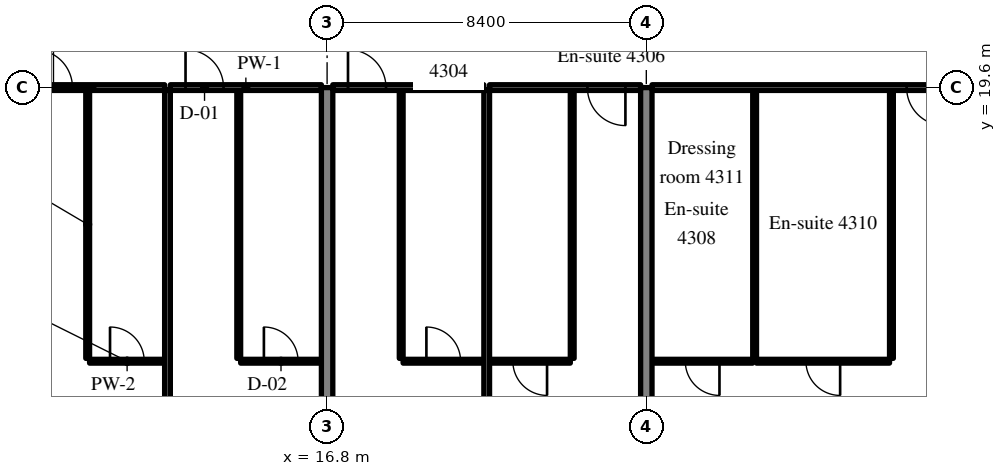
"""IFC4 building model, lengths in metres.
Left out: names, types, materials, properties, quantities, classifications, styles, units other than length and angle.
Written with IfcOpenShell. Run it as: python <this file> out.ifc"""

import sys

from ifc_helpers import new_model, si_unit, direction, frame, frame_2d, origin, place, context, subcontext, project, spatial, rectangle, extrude, source, transform, mapped, element, fill, save


model = new_model("IFC4")
c1 = context("Model", 3, precision=1e-05, world=origin(), true_north=direction((0.0, 1.0)))
c2 = subcontext(c1, "Body", "Model", "MODEL_VIEW")
j1 = project(units=[si_unit("LENGTHUNIT", "METRE"), si_unit("PLANEANGLEUNIT", "RADIAN")], contexts=[c1])
p1 = place(None, origin())
s1 = spatial("IfcSite", under=j1, at=p1, CompositionType="ELEMENT")
p2 = place(p1, origin())
s2 = spatial("IfcBuilding", under=s1, at=p2, CompositionType="ELEMENT")
p3 = place(p2, frame((0.0, 0.0, 178.2)))
s3 = spatial("IfcBuildingStorey", under=s2, at=p3, CompositionType="ELEMENT", Elevation=178.2)
m1 = source(origin(), c2, "Body", "SweptSolid", [
    extrude(rectangle(XDim=14.1, YDim=0.3, at=frame_2d((7.05, 0.0))), origin(), (0.0, 0.0, 1.0), 3.52),
])
for number, where, z_axis, x_axis in (
    (1, (16.8, 5.5, 0.0), (0.0, 0.0, 1.0), (0.0, 1.0, 0.0)),
    (2, (25.2, 5.5, 0.0), (0.0, 0.0, 1.0), (0.0, 1.0, 0.0)),
):
    element("IfcWall", number, at=place(p3, frame(where, z_axis=z_axis, x_axis=x_axis)), inside=s3, PredefinedType="SHEAR", context=c2, shape_type="MappedRepresentation", body=[
        mapped(m1, transform((0.0, 0.0, 0.0), scale=1.0)),
    ])
m2 = source(origin(), c2, "Body", "SweptSolid", [
    extrude(rectangle(XDim=7.05, YDim=0.1, at=frame_2d((3.525, 0.0))), origin(), (0.0, 0.0, 1.0), 3.52),
])
p4 = place(p3, frame((10.5, 12.475, 0.0), z_axis=(0.0, 0.0, 1.0), x_axis=(0.0, 1.0, 0.0)))
e3 = element("IfcWall", 3, at=p4, inside=s3, PredefinedType="PARTITIONING", context=c2, shape_type="MappedRepresentation", body=[
    mapped(m2, transform((0.0, 0.0, 0.0), scale=1.0)),
])
m3 = source(origin(), c2, "Body", "SweptSolid", [
    extrude(rectangle(XDim=1.975, YDim=0.1, at=frame_2d((0.987, 0.0))), origin(), (0.0, 0.0, 1.0), 3.52),
])
p5 = place(p3, frame((10.55, 12.4, 0.0), z_axis=(0.0, 0.0, 1.0), x_axis=(1.0, 0.0, 0.0)))
e4 = element("IfcWall", 4, at=p5, inside=s3, PredefinedType="PARTITIONING", context=c2, shape_type="MappedRepresentation", body=[
    mapped(m3, transform((0.0, 0.0, 0.0), scale=1.0)),
])
m4 = source(origin(), c2, "Body", "SweptSolid", [
    extrude(rectangle(XDim=0.9, YDim=2.1, at=frame_2d((0.45, 1.05))), frame((0.0, 0.06, 0.0), z_axis=(0.0, -1.0, 0.0), x_axis=(1.0, 0.0, 0.0)), (0.0, 0.0, 1.0), 0.12),
])
p6 = place(p5, frame((0.538, 0.0, 0.0)))
e5 = element("IfcOpeningElement", 5, at=p6, cuts=e4, PredefinedType="OPENING", context=c2, shape_type="MappedRepresentation", body=[
    mapped(m4, transform((0.0, 0.0, 0.0), scale=1.0)),
])
m5 = source(origin(), c2, "Body", "SweptSolid", [
    extrude(rectangle(XDim=3.825, YDim=0.15, at=frame_2d((1.913, 0.0))), origin(), (0.0, 0.0, 1.0), 2.82),
])
p7 = place(p3, frame((8.7, 19.6, 0.0), z_axis=(0.0, 0.0, 1.0), x_axis=(1.0, 0.0, 0.0)))
e6 = element("IfcWall", 6, at=p7, inside=s3, PredefinedType="PARTITIONING", context=c2, shape_type="MappedRepresentation", body=[
    mapped(m5, transform((0.0, 0.0, 0.0), scale=1.0)),
])
m6 = source(origin(), c2, "Body", "SweptSolid", [
    extrude(rectangle(XDim=1.0, YDim=2.1, at=frame_2d((0.5, 1.05))), frame((0.0, 0.085, 0.0), z_axis=(0.0, -1.0, 0.0), x_axis=(1.0, 0.0, 0.0)), (0.0, 0.0, 1.0), 0.17),
])
p8 = place(p7, frame((0.4, 0.0, 0.0)))
e7 = element("IfcOpeningElement", 7, at=p8, cuts=e6, PredefinedType="OPENING", context=c2, shape_type="MappedRepresentation", body=[
    mapped(m6, transform((0.0, 0.0, 0.0), scale=1.0)),
])
p9 = place(p3, frame((14.475, 12.475, 0.0), z_axis=(0.0, 0.0, 1.0), x_axis=(0.0, 1.0, 0.0)))
e8 = element("IfcWall", 8, at=p9, inside=s3, PredefinedType="PARTITIONING", context=c2, shape_type="MappedRepresentation", body=[
    mapped(m2, transform((0.0, 0.0, 0.0), scale=1.0)),
])
m7 = source(origin(), c2, "Body", "SweptSolid", [
    extrude(rectangle(XDim=2.125, YDim=0.1, at=frame_2d((1.062, 0.0))), origin(), (0.0, 0.0, 1.0), 3.52),
])
p10 = place(p3, frame((14.525, 12.4, 0.0), z_axis=(0.0, 0.0, 1.0), x_axis=(1.0, 0.0, 0.0)))
e9 = element("IfcWall", 9, at=p10, inside=s3, PredefinedType="PARTITIONING", context=c2, shape_type="MappedRepresentation", body=[
    mapped(m7, transform((0.0, 0.0, 0.0), scale=1.0)),
])
p11 = place(p10, frame((0.612, 0.0, 0.0)))
e10 = element("IfcOpeningElement", 10, at=p11, cuts=e9, PredefinedType="OPENING", context=c2, shape_type="MappedRepresentation", body=[
    mapped(m4, transform((0.0, 0.0, 0.0), scale=1.0)),
])
m8 = source(origin(), c2, "Body", "SweptSolid", [
    extrude(rectangle(XDim=3.975, YDim=0.15, at=frame_2d((1.987, 0.0))), origin(), (0.0, 0.0, 1.0), 2.82),
])
p12 = place(p3, frame((12.675, 19.6, 0.0), z_axis=(0.0, 0.0, 1.0), x_axis=(1.0, 0.0, 0.0)))
e11 = element("IfcWall", 11, at=p12, inside=s3, PredefinedType="PARTITIONING", context=c2, shape_type="MappedRepresentation", body=[
    mapped(m8, transform((0.0, 0.0, 0.0), scale=1.0)),
])
p13 = place(p12, frame((0.4, 0.0, 0.0)))
e12 = element("IfcOpeningElement", 12, at=p13, cuts=e11, PredefinedType="OPENING", context=c2, shape_type="MappedRepresentation", body=[
    mapped(m6, transform((0.0, 0.0, 0.0), scale=1.0)),
])
m9 = source(origin(), c2, "Body", "SweptSolid", [
    extrude(rectangle(XDim=13.447, YDim=0.15, at=frame_2d((6.724, 0.0))), origin(), (0.0, 0.0, 1.0), 3.52),
])
p14 = place(p3, frame((12.6, 6.078, 0.0), z_axis=(0.0, 0.0, 1.0), x_axis=(0.0, 1.0, 0.0)))
e13 = element("IfcWall", 13, at=p14, inside=s3, PredefinedType="PARTITIONING", context=c2, shape_type="MappedRepresentation", body=[
    mapped(m9, transform((0.0, 0.0, 0.0), scale=1.0)),
])
p15 = place(p3, frame((18.75, 12.475, 0.0), z_axis=(0.0, 0.0, 1.0), x_axis=(0.0, 1.0, 0.0)))
e14 = element("IfcWall", 14, at=p15, inside=s3, PredefinedType="PARTITIONING", context=c2, shape_type="MappedRepresentation", body=[
    mapped(m2, transform((0.0, 0.0, 0.0), scale=1.0)),
])
p16 = place(p3, frame((18.8, 12.4, 0.0), z_axis=(0.0, 0.0, 1.0), x_axis=(1.0, 0.0, 0.0)))
e15 = element("IfcWall", 15, at=p16, inside=s3, PredefinedType="PARTITIONING", context=c2, shape_type="MappedRepresentation", body=[
    mapped(m7, transform((0.0, 0.0, 0.0), scale=1.0)),
])
p17 = place(p16, frame((0.613, 0.0, 0.0)))
e16 = element("IfcOpeningElement", 16, at=p17, cuts=e15, PredefinedType="OPENING", context=c2, shape_type="MappedRepresentation", body=[
    mapped(m4, transform((0.0, 0.0, 0.0), scale=1.0)),
])
m10 = source(origin(), c2, "Body", "SweptSolid", [
    extrude(rectangle(XDim=3.975, YDim=0.15, at=frame_2d((1.988, 0.0))), origin(), (0.0, 0.0, 1.0), 2.82),
])
p18 = place(p3, frame((16.95, 19.6, 0.0), z_axis=(0.0, 0.0, 1.0), x_axis=(1.0, 0.0, 0.0)))
e17 = element("IfcWall", 17, at=p18, inside=s3, PredefinedType="PARTITIONING", context=c2, shape_type="MappedRepresentation", body=[
    mapped(m10, transform((0.0, 0.0, 0.0), scale=1.0)),
])
p19 = place(p18, frame((0.4, 0.0, 0.0)))
e18 = element("IfcOpeningElement", 18, at=p19, cuts=e17, PredefinedType="OPENING", context=c2, shape_type="MappedRepresentation", body=[
    mapped(m6, transform((0.0, 0.0, 0.0), scale=1.0)),
])
p20 = place(p3, frame((23.25, 12.475, 0.0), z_axis=(0.0, 0.0, 1.0), x_axis=(0.0, 1.0, 0.0)))
e19 = element("IfcWall", 19, at=p20, inside=s3, PredefinedType="PARTITIONING", context=c2, shape_type="MappedRepresentation", body=[
    mapped(m2, transform((0.0, 0.0, 0.0), scale=1.0)),
])
p21 = place(p3, frame((21.075, 12.4, 0.0), z_axis=(0.0, 0.0, 1.0), x_axis=(1.0, 0.0, 0.0)))
e20 = element("IfcWall", 20, at=p21, inside=s3, PredefinedType="PARTITIONING", context=c2, shape_type="MappedRepresentation", body=[
    mapped(m7, transform((0.0, 0.0, 0.0), scale=1.0)),
])
p22 = place(p21, frame((0.613, 0.0, 0.0)))
e21 = element("IfcOpeningElement", 21, at=p22, cuts=e20, PredefinedType="OPENING", context=c2, shape_type="MappedRepresentation", body=[
    mapped(m4, transform((0.0, 0.0, 0.0), scale=1.0)),
])
p23 = place(p3, frame((21.075, 19.6, 0.0), z_axis=(0.0, 0.0, 1.0), x_axis=(1.0, 0.0, 0.0)))
e22 = element("IfcWall", 22, at=p23, inside=s3, PredefinedType="PARTITIONING", context=c2, shape_type="MappedRepresentation", body=[
    mapped(m10, transform((0.0, 0.0, 0.0), scale=1.0)),
])
p24 = place(p23, frame((2.575, 0.0, 0.0)))
e23 = element("IfcOpeningElement", 23, at=p24, cuts=e22, PredefinedType="OPENING", context=c2, shape_type="MappedRepresentation", body=[
    mapped(m6, transform((0.0, 0.0, 0.0), scale=1.0)),
])
m11 = source(origin(), c2, "Body", "SweptSolid", [
    extrude(rectangle(XDim=12.275, YDim=0.15, at=frame_2d((6.137, 0.0))), origin(), (0.0, 0.0, 1.0), 3.52),
])
p25 = place(p3, frame((21.0, 7.25, 0.0), z_axis=(0.0, 0.0, 1.0), x_axis=(0.0, 1.0, 0.0)))
e24 = element("IfcWall", 24, at=p25, inside=s3, PredefinedType="PARTITIONING", context=c2, shape_type="MappedRepresentation", body=[
    mapped(m11, transform((0.0, 0.0, 0.0), scale=1.0)),
])
for number, where, z_axis, x_axis in (
    (25, (31.65, 12.475, 0.0), (0.0, 0.0, 1.0), (0.0, 1.0, 0.0)),
    (26, (28.05, 12.475, 0.0), (0.0, 0.0, 1.0), (0.0, 1.0, 0.0)),
):
    element("IfcWall", number, at=place(p3, frame(where, z_axis=z_axis, x_axis=x_axis)), inside=s3, PredefinedType="PARTITIONING", context=c2, shape_type="MappedRepresentation", body=[
        mapped(m2, transform((0.0, 0.0, 0.0), scale=1.0)),
    ])
m12 = source(origin(), c2, "Body", "SweptSolid", [
    extrude(rectangle(XDim=3.5, YDim=0.1, at=frame_2d((1.75, 0.0))), origin(), (0.0, 0.0, 1.0), 3.52),
])
p26 = place(p3, frame((28.1, 12.4, 0.0), z_axis=(0.0, 0.0, 1.0), x_axis=(1.0, 0.0, 0.0)))
e27 = element("IfcWall", 27, at=p26, inside=s3, PredefinedType="PARTITIONING", context=c2, shape_type="MappedRepresentation", body=[
    mapped(m12, transform((0.0, 0.0, 0.0), scale=1.0)),
])
p27 = place(p26, frame((1.3, 0.0, 0.0)))
e28 = element("IfcOpeningElement", 28, at=p27, cuts=e27, PredefinedType="OPENING", context=c2, shape_type="MappedRepresentation", body=[
    mapped(m4, transform((0.0, 0.0, 0.0), scale=1.0)),
])
m13 = source(origin(), c2, "Body", "SweptSolid", [
    extrude(rectangle(XDim=2.65, YDim=0.1, at=frame_2d((1.325, 0.0))), origin(), (0.0, 0.0, 1.0), 3.52),
])
p28 = place(p3, frame((25.35, 12.4, 0.0), z_axis=(0.0, 0.0, 1.0), x_axis=(1.0, 0.0, 0.0)))
e29 = element("IfcWall", 29, at=p28, inside=s3, PredefinedType="PARTITIONING", context=c2, shape_type="MappedRepresentation", body=[
    mapped(m13, transform((0.0, 0.0, 0.0), scale=1.0)),
])
p29 = place(p28, frame((0.875, 0.0, 0.0)))
e30 = element("IfcOpeningElement", 30, at=p29, cuts=e29, PredefinedType="OPENING", context=c2, shape_type="MappedRepresentation", body=[
    mapped(m4, transform((0.0, 0.0, 0.0), scale=1.0)),
])
m14 = source(origin(), c2, "Body", "SweptSolid", [
    extrude(rectangle(XDim=8.1, YDim=0.15, at=frame_2d((4.05, 0.0))), origin(), (0.0, 0.0, 1.0), 2.82),
])
p30 = place(p3, frame((25.35, 19.6, 0.0), z_axis=(0.0, 0.0, 1.0), x_axis=(1.0, 0.0, 0.0)))
e31 = element("IfcWall", 31, at=p30, inside=s3, PredefinedType="PARTITIONING", context=c2, shape_type="MappedRepresentation", body=[
    mapped(m14, transform((0.0, 0.0, 0.0), scale=1.0)),
])
p31 = place(p30, frame((6.7, 0.0, 0.0)))
e32 = element("IfcOpeningElement", 32, at=p31, cuts=e31, PredefinedType="OPENING", context=c2, shape_type="MappedRepresentation", body=[
    mapped(m6, transform((0.0, 0.0, 0.0), scale=1.0)),
])
m15 = source(origin(), c2, "Body", "SweptSolid", [
    extrude(rectangle(XDim=0.9, YDim=2.1, at=frame_2d((0.45, 1.05))), frame((0.0, 0.025, 0.0), z_axis=(0.0, -1.0, 0.0), x_axis=(1.0, 0.0, 0.0)), (0.0, 0.0, 1.0), 0.05),
])
p32 = place(p6, origin())
e33 = element("IfcDoor", 33, at=p32, inside=s3, OperationType="SINGLE_SWING_LEFT", PredefinedType="DOOR", context=c2, shape_type="MappedRepresentation", body=[
    mapped(m15, transform((0.0, 0.0, 0.0), scale=1.0)),
])
fill(e5, e33)
m16 = source(origin(), c2, "Body", "SweptSolid", [
    extrude(rectangle(XDim=1.0, YDim=2.1, at=frame_2d((0.5, 1.05))), frame((0.0, 0.025, 0.0), z_axis=(0.0, -1.0, 0.0), x_axis=(1.0, 0.0, 0.0)), (0.0, 0.0, 1.0), 0.05),
])
p33 = place(p8, origin())
e34 = element("IfcDoor", 34, at=p33, inside=s3, OperationType="SINGLE_SWING_LEFT", PredefinedType="DOOR", context=c2, shape_type="MappedRepresentation", body=[
    mapped(m16, transform((0.0, 0.0, 0.0), scale=1.0)),
])
fill(e7, e34)
p34 = place(p11, origin())
e35 = element("IfcDoor", 35, at=p34, inside=s3, OperationType="SINGLE_SWING_LEFT", PredefinedType="DOOR", context=c2, shape_type="MappedRepresentation", body=[
    mapped(m15, transform((0.0, 0.0, 0.0), scale=1.0)),
])
fill(e10, e35)
p35 = place(p13, origin())
e36 = element("IfcDoor", 36, at=p35, inside=s3, OperationType="SINGLE_SWING_LEFT", PredefinedType="DOOR", context=c2, shape_type="MappedRepresentation", body=[
    mapped(m16, transform((0.0, 0.0, 0.0), scale=1.0)),
])
fill(e12, e36)
p36 = place(p17, origin())
e37 = element("IfcDoor", 37, at=p36, inside=s3, OperationType="SINGLE_SWING_LEFT", PredefinedType="DOOR", context=c2, shape_type="MappedRepresentation", body=[
    mapped(m15, transform((0.0, 0.0, 0.0), scale=1.0)),
])
fill(e16, e37)
p37 = place(p19, origin())
e38 = element("IfcDoor", 38, at=p37, inside=s3, OperationType="SINGLE_SWING_LEFT", PredefinedType="DOOR", context=c2, shape_type="MappedRepresentation", body=[
    mapped(m16, transform((0.0, 0.0, 0.0), scale=1.0)),
])
fill(e18, e38)
p38 = place(p22, origin())
e39 = element("IfcDoor", 39, at=p38, inside=s3, OperationType="SINGLE_SWING_RIGHT", PredefinedType="DOOR", context=c2, shape_type="MappedRepresentation", body=[
    mapped(m15, transform((0.0, 0.0, 0.0), scale=1.0)),
])
fill(e21, e39)
p39 = place(p24, origin())
e40 = element("IfcDoor", 40, at=p39, inside=s3, OperationType="SINGLE_SWING_RIGHT", PredefinedType="DOOR", context=c2, shape_type="MappedRepresentation", body=[
    mapped(m16, transform((0.0, 0.0, 0.0), scale=1.0)),
])
fill(e23, e40)
p40 = place(p27, origin())
e41 = element("IfcDoor", 41, at=p40, inside=s3, OperationType="SINGLE_SWING_RIGHT", PredefinedType="DOOR", context=c2, shape_type="MappedRepresentation", body=[
    mapped(m15, transform((0.0, 0.0, 0.0), scale=1.0)),
])
fill(e28, e41)
p41 = place(p29, origin())
e42 = element("IfcDoor", 42, at=p41, inside=s3, OperationType="SINGLE_SWING_RIGHT", PredefinedType="DOOR", context=c2, shape_type="MappedRepresentation", body=[
    mapped(m15, transform((0.0, 0.0, 0.0), scale=1.0)),
])
fill(e30, e42)
p42 = place(p31, origin())
e43 = element("IfcDoor", 43, at=p42, inside=s3, OperationType="SINGLE_SWING_RIGHT", PredefinedType="DOOR", context=c2, shape_type="MappedRepresentation", body=[
    mapped(m16, transform((0.0, 0.0, 0.0), scale=1.0)),
])
fill(e32, e43)
save(model, sys.argv[1])
